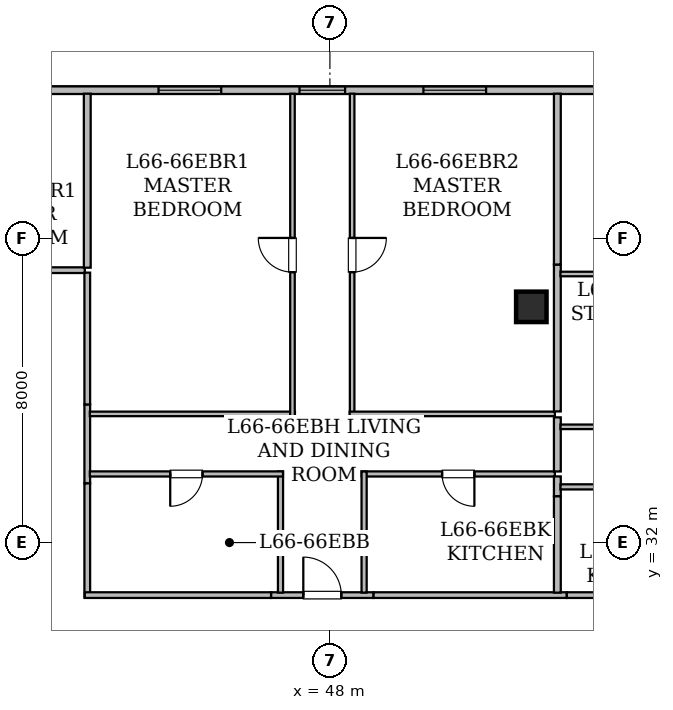
"""IFC4 building model, lengths in metres.
Left out: names, types, materials, properties, quantities, classifications, styles, units other than length and angle.
Written with IfcOpenShell. Run it as: python <this file> out.ifc"""

import sys

from ifc_helpers import new_model, si_unit, direction, frame, frame_2d, origin, origin_2d, place, context, subcontext, project, spatial, rectangle, hollow_rectangle, extrude, element, fill, save


model = new_model("IFC4")
c1 = context("Model", 3, precision=1e-05, world=origin(), true_north=direction((0.0, 1.0)))
c2 = subcontext(c1, "Body", "Model", "MODEL_VIEW")
j1 = project(units=[si_unit("LENGTHUNIT", "METRE"), si_unit("PLANEANGLEUNIT", "RADIAN")], contexts=[c1])
p1 = place(None, origin())
s1 = spatial("IfcSite", under=j1, at=p1, CompositionType="ELEMENT")
p2 = place(p1, origin())
s2 = spatial("IfcBuilding", under=s1, at=p2, CompositionType="ELEMENT")
p3 = place(p2, frame((0.0, 0.0, 257.35)))
s3 = spatial("IfcBuildingStorey", under=s2, at=p3, CompositionType="ELEMENT", Elevation=257.35)
for number, where, z_axis, x_axis in (
    (1, (51.083, 41.5, 0.0), (0.0, 0.0, 1.0), (1.0, 0.0, 0.0)),
    (2, (53.3, 38.2, 0.0), (0.0, 0.0, 1.0), (1.0, 0.0, 0.0)),
):
    element("IfcColumn", number, at=place(p3, frame(where, z_axis=z_axis, x_axis=x_axis)), inside=s3, PredefinedType="COLUMN", context=c2, shape_type="SweptSolid", body=[
        extrude(hollow_rectangle(XDim=0.8, YDim=0.8, WallThickness=0.04, at=origin_2d()), origin(), (0.0, 0.0, 1.0), 3.65),
    ])
p4 = place(p3, frame((24.302, 43.9, 0.0), z_axis=(0.0, 0.0, 1.0), x_axis=(1.0, 0.0, 0.0)))
e3 = element("IfcWall", 3, at=p4, inside=s3, PredefinedType="STANDARD", context=c2, shape_type="SweptSolid", body=[
    extrude(rectangle(XDim=41.457, YDim=0.2, at=frame_2d((20.729, 0.0))), origin(), (0.0, 0.0, 1.0), 3.43),
])
p5 = place(p4, frame((0.604, 0.0, 0.85)))
e4 = element("IfcOpeningElement", 4, at=p5, cuts=e3, PredefinedType="OPENING", context=c2, shape_type="SweptSolid", body=[
    extrude(rectangle(XDim=1.65, YDim=1.55, at=frame_2d((0.825, 0.775))), frame((0.0, 0.11, 0.0), z_axis=(0.0, -1.0, 0.0), x_axis=(1.0, 0.0, 0.0)), (0.0, 0.0, 1.0), 0.22),
])
p6 = place(p4, frame((9.098, 0.0, 0.85)))
e5 = element("IfcOpeningElement", 5, at=p6, cuts=e3, PredefinedType="OPENING", context=c2, shape_type="SweptSolid", body=[
    extrude(rectangle(XDim=1.65, YDim=1.55, at=frame_2d((0.825, 0.775))), frame((0.0, 0.11, 0.0), z_axis=(0.0, -1.0, 0.0), x_axis=(1.0, 0.0, 0.0)), (0.0, 0.0, 1.0), 0.22),
])
p7 = place(p4, frame((14.405, 0.0, 0.85)))
e6 = element("IfcOpeningElement", 6, at=p7, cuts=e3, PredefinedType="OPENING", context=c2, shape_type="SweptSolid", body=[
    extrude(rectangle(XDim=1.65, YDim=1.55, at=frame_2d((0.825, 0.775))), frame((0.0, 0.11, 0.0), z_axis=(0.0, -1.0, 0.0), x_axis=(1.0, 0.0, 0.0)), (0.0, 0.0, 1.0), 0.22),
])
p8 = place(p4, frame((22.898, 0.0, 0.8)))
e7 = element("IfcOpeningElement", 7, at=p8, cuts=e3, PredefinedType="OPENING", context=c2, shape_type="SweptSolid", body=[
    extrude(rectangle(XDim=1.2, YDim=1.5, at=frame_2d((0.6, 0.75))), frame((0.0, 0.11, 0.0), z_axis=(0.0, -1.0, 0.0), x_axis=(1.0, 0.0, 0.0)), (0.0, 0.0, 1.0), 0.22),
])
p9 = place(p4, frame((19.188, 0.0, 0.85)))
e8 = element("IfcOpeningElement", 8, at=p9, cuts=e3, PredefinedType="OPENING", context=c2, shape_type="SweptSolid", body=[
    extrude(rectangle(XDim=1.65, YDim=1.55, at=frame_2d((0.825, 0.775))), frame((0.0, 0.11, 0.0), z_axis=(0.0, -1.0, 0.0), x_axis=(1.0, 0.0, 0.0)), (0.0, 0.0, 1.0), 0.22),
])
p10 = place(p4, frame((26.158, 0.0, 0.85)))
e9 = element("IfcOpeningElement", 9, at=p10, cuts=e3, PredefinedType="OPENING", context=c2, shape_type="SweptSolid", body=[
    extrude(rectangle(XDim=1.65, YDim=1.55, at=frame_2d((0.825, 0.775))), frame((0.0, 0.11, 0.0), z_axis=(0.0, -1.0, 0.0), x_axis=(1.0, 0.0, 0.0)), (0.0, 0.0, 1.0), 0.22),
])
p11 = place(p4, frame((32.408, 0.0, 0.85)))
e10 = element("IfcOpeningElement", 10, at=p11, cuts=e3, PredefinedType="OPENING", context=c2, shape_type="SweptSolid", body=[
    extrude(rectangle(XDim=1.65, YDim=1.55, at=frame_2d((0.825, 0.775))), frame((0.0, 0.11, 0.0), z_axis=(0.0, -1.0, 0.0), x_axis=(1.0, 0.0, 0.0)), (0.0, 0.0, 1.0), 0.22),
])
p12 = place(p3, frame((37.699, 39.165, 0.0), z_axis=(0.0, 0.0, 1.0), x_axis=(1.0, 0.0, 0.0)))
e11 = element("IfcWall", 11, at=p12, inside=s3, PredefinedType="STANDARD", context=c2, shape_type="SweptSolid", body=[
    extrude(rectangle(XDim=3.851, YDim=0.15, at=frame_2d((1.926, 0.0))), origin(), (0.0, 0.0, 1.0), 2.725),
])
p13 = place(p3, frame((41.615, 35.632, 0.0), z_axis=(0.0, 0.0, 1.0), x_axis=(0.0, -1.0, 0.0)))
e12 = element("IfcWall", 12, at=p13, inside=s3, PredefinedType="STANDARD", context=c2, shape_type="SweptSolid", body=[
    extrude(rectangle(XDim=2.078, YDim=0.15, at=frame_2d((1.039, 0.0))), origin(), (0.0, 0.0, 1.0), 3.43),
])
p14 = place(p3, frame((46.451, 30.615, 0.0), z_axis=(0.0, 0.0, 1.0), x_axis=(1.0, 0.0, 0.0)))
e13 = element("IfcWall", 13, at=p14, inside=s3, PredefinedType="STANDARD", context=c2, shape_type="SweptSolid", body=[
    extrude(rectangle(XDim=2.698, YDim=0.15, at=frame_2d((1.349, 0.0))), origin(), (0.0, 0.0, 1.0), 3.43),
])
p15 = place(p14, frame((0.849, 0.0, 0.0)))
e14 = element("IfcOpeningElement", 14, at=p15, cuts=e13, PredefinedType="OPENING", context=c2, shape_type="SweptSolid", body=[
    extrude(rectangle(XDim=1.0, YDim=2.15, at=frame_2d((0.5, 1.075))), frame((0.0, 0.085, 0.0), z_axis=(0.0, -1.0, 0.0), x_axis=(1.0, 0.0, 0.0)), (0.0, 0.0, 1.0), 0.17),
])
p16 = place(p3, frame((41.615, 33.554, 0.0), z_axis=(0.0, 0.0, 1.0), x_axis=(0.0, -1.0, 0.0)))
e15 = element("IfcWall", 15, at=p16, inside=s3, PredefinedType="STANDARD", context=c2, shape_type="SweptSolid", body=[
    extrude(rectangle(XDim=3.004, YDim=0.15, at=frame_2d((1.502, 0.0))), origin(), (0.0, 0.0, 1.0), 3.065),
])
p17 = place(p3, frame((41.55, 30.615, 0.0), z_axis=(0.0, 0.0, 1.0), x_axis=(1.0, 0.0, 0.0)))
e16 = element("IfcWall", 16, at=p17, inside=s3, PredefinedType="STANDARD", context=c2, shape_type="SweptSolid", body=[
    extrude(rectangle(XDim=4.901, YDim=0.15, at=frame_2d((2.45, 0.0))), origin(), (0.0, 0.0, 1.0), 3.43),
])
p18 = place(p3, frame((49.149, 30.615, 0.0), z_axis=(0.0, 0.0, 1.0), x_axis=(1.0, 0.0, 0.0)))
e17 = element("IfcWall", 17, at=p18, inside=s3, PredefinedType="STANDARD", context=c2, shape_type="SweptSolid", body=[
    extrude(rectangle(XDim=5.085, YDim=0.15, at=frame_2d((2.542, 0.0))), origin(), (0.0, 0.0, 1.0), 2.725),
])
p19 = place(p3, frame((41.615, 39.1, 0.0), z_axis=(0.0, 0.0, 1.0), x_axis=(0.0, -1.0, 0.0)))
e18 = element("IfcWall", 18, at=p19, inside=s3, PredefinedType="STANDARD", context=c2, shape_type="SweptSolid", body=[
    extrude(rectangle(XDim=3.468, YDim=0.15, at=frame_2d((1.734, 0.0))), origin(), (0.0, 0.0, 1.0), 2.725),
])
p20 = place(p3, frame((54.234, 30.615, 0.0), z_axis=(0.0, 0.0, 1.0), x_axis=(1.0, 0.0, 0.0)))
e19 = element("IfcWall", 19, at=p20, inside=s3, PredefinedType="STANDARD", context=c2, shape_type="SweptSolid", body=[
    extrude(rectangle(XDim=5.03, YDim=0.15, at=frame_2d((2.515, 0.0))), origin(), (0.0, 0.0, 1.0), 3.43),
])
p21 = place(p3, frame((41.615, 43.808, 0.0), z_axis=(0.0, 0.0, 1.0), x_axis=(0.0, -1.0, 0.0)))
e20 = element("IfcWall", 20, at=p21, inside=s3, PredefinedType="STANDARD", context=c2, shape_type="SweptSolid", body=[
    extrude(rectangle(XDim=4.578, YDim=0.18, at=frame_2d((2.289, 0.0))), origin(), (0.0, 0.0, 1.0), 2.887),
])
p22 = place(p3, frame((46.7, 30.68, 0.0), z_axis=(0.0, 0.0, 1.0), x_axis=(0.0, 1.0, 0.0)))
e21 = element("IfcWall", 21, at=p22, inside=s3, PredefinedType="PARTITIONING", context=c2, shape_type="SweptSolid", body=[
    extrude(rectangle(XDim=3.188, YDim=0.135, at=frame_2d((1.594, 0.0))), origin(), (0.0, 0.0, 1.0), 3.065),
])
p23 = place(p3, frame((46.765, 33.803, 0.0), z_axis=(0.0, 0.0, 1.0), x_axis=(-1.0, 0.0, 0.0)))
e22 = element("IfcWall", 22, at=p23, inside=s3, PredefinedType="PARTITIONING", context=c2, shape_type="SweptSolid", body=[
    extrude(rectangle(XDim=5.083, YDim=0.135, at=frame_2d((2.542, 0.0))), origin(), (0.0, 0.0, 1.0), 3.43),
])
p24 = place(p23, frame((2.117, 0.0, 0.0)))
e23 = element("IfcOpeningElement", 23, at=p24, cuts=e22, PredefinedType="OPENING", context=c2, shape_type="SweptSolid", body=[
    extrude(rectangle(XDim=0.85, YDim=2.1, at=frame_2d((0.425, 1.05))), frame((0.0, 0.077, 0.0), z_axis=(0.0, -1.0, 0.0), x_axis=(1.0, 0.0, 0.0)), (0.0, 0.0, 1.0), 0.155),
])
p25 = place(p3, frame((53.92, 33.803, 0.0), z_axis=(0.0, 0.0, 1.0), x_axis=(-1.0, 0.0, 0.0)))
e24 = element("IfcWall", 24, at=p25, inside=s3, PredefinedType="PARTITIONING", context=c2, shape_type="SweptSolid", body=[
    extrude(rectangle(XDim=5.085, YDim=0.135, at=frame_2d((2.542, 0.0))), origin(), (0.0, 0.0, 1.0), 2.725),
])
p26 = place(p25, frame((2.118, 0.0, 0.0)))
e25 = element("IfcOpeningElement", 25, at=p26, cuts=e24, PredefinedType="OPENING", context=c2, shape_type="SweptSolid", body=[
    extrude(rectangle(XDim=0.85, YDim=2.1, at=frame_2d((0.425, 1.05))), frame((0.0, 0.077, 0.0), z_axis=(0.0, -1.0, 0.0), x_axis=(1.0, 0.0, 0.0)), (0.0, 0.0, 1.0), 0.155),
])
p27 = place(p3, frame((48.9, 33.868, 0.0), z_axis=(0.0, 0.0, 1.0), x_axis=(0.0, -1.0, 0.0)))
e26 = element("IfcWall", 26, at=p27, inside=s3, PredefinedType="PARTITIONING", context=c2, shape_type="SweptSolid", body=[
    extrude(rectangle(XDim=3.188, YDim=0.135, at=frame_2d((1.594, 0.0))), origin(), (0.0, 0.0, 1.0), 3.065),
])
p28 = place(p3, frame((41.682, 35.383, 0.0), z_axis=(0.0, 0.0, 1.0), x_axis=(1.0, 0.0, 0.0)))
e27 = element("IfcWall", 27, at=p28, inside=s3, PredefinedType="PARTITIONING", context=c2, shape_type="SweptSolid", body=[
    extrude(rectangle(XDim=5.398, YDim=0.12, at=frame_2d((2.699, 0.0))), origin(), (0.0, 0.0, 1.0), 3.43),
])
p29 = place(p3, frame((47.015, 35.318, 0.0), z_axis=(0.0, 0.0, 1.0), x_axis=(0.0, 1.0, 0.0)))
e28 = element("IfcWall", 28, at=p29, inside=s3, PredefinedType="PARTITIONING", context=c2, shape_type="SweptSolid", body=[
    extrude(rectangle(XDim=8.49, YDim=0.12, at=frame_2d((4.245, 0.0))), origin(), (0.0, 0.0, 1.0), 2.725),
])
p30 = place(p29, frame((3.795, 0.0, 0.0)))
e29 = element("IfcOpeningElement", 29, at=p30, cuts=e28, PredefinedType="OPENING", context=c2, shape_type="SweptSolid", body=[
    extrude(rectangle(XDim=0.9, YDim=2.1, at=frame_2d((0.45, 1.05))), frame((0.0, 0.07, 0.0), z_axis=(0.0, -1.0, 0.0), x_axis=(1.0, 0.0, 0.0)), (0.0, 0.0, 1.0), 0.14),
])
p31 = place(p3, frame((48.585, 43.808, 0.0), z_axis=(0.0, 0.0, 1.0), x_axis=(0.0, -1.0, 0.0)))
e30 = element("IfcWall", 30, at=p31, inside=s3, PredefinedType="PARTITIONING", context=c2, shape_type="SweptSolid", body=[
    extrude(rectangle(XDim=8.49, YDim=0.12, at=frame_2d((4.245, 0.0))), origin(), (0.0, 0.0, 1.0), 2.725),
])
p32 = place(p31, frame((3.795, 0.0, 0.0)))
e31 = element("IfcOpeningElement", 31, at=p32, cuts=e30, PredefinedType="OPENING", context=c2, shape_type="SweptSolid", body=[
    extrude(rectangle(XDim=0.9, YDim=2.1, at=frame_2d((0.45, 1.05))), frame((0.0, 0.07, 0.0), z_axis=(0.0, -1.0, 0.0), x_axis=(1.0, 0.0, 0.0)), (0.0, 0.0, 1.0), 0.14),
])
p33 = place(p3, frame((48.52, 35.383, 0.0), z_axis=(0.0, 0.0, 1.0), x_axis=(1.0, 0.0, 0.0)))
e32 = element("IfcWall", 32, at=p33, inside=s3, PredefinedType="PARTITIONING", context=c2, shape_type="SweptSolid", body=[
    extrude(rectangle(XDim=5.4, YDim=0.12, at=frame_2d((2.7, 0.0))), origin(), (0.0, 0.0, 1.0), 2.725),
])
p34 = place(p3, frame((53.985, 35.292, 0.0), z_axis=(0.0, 0.0, 1.0), x_axis=(0.0, -1.0, 0.0)))
e33 = element("IfcWall", 33, at=p34, inside=s3, PredefinedType="STANDARD", context=c2, shape_type="SweptSolid", body=[
    extrude(rectangle(XDim=1.424, YDim=0.18, at=frame_2d((0.712, 0.0))), origin(), (0.0, 0.0, 1.0), 3.43),
])
p35 = place(p3, frame((53.985, 33.738, 0.0), z_axis=(0.0, 0.0, 1.0), x_axis=(0.0, -1.0, 0.0)))
e34 = element("IfcWall", 34, at=p35, inside=s3, PredefinedType="STANDARD", context=c2, shape_type="SweptSolid", body=[
    extrude(rectangle(XDim=0.524, YDim=0.18, at=frame_2d((0.262, 0.0))), origin(), (0.0, 0.0, 1.0), 3.065),
])
p36 = place(p3, frame((53.985, 33.214, 0.0), z_axis=(0.0, 0.0, 1.0), x_axis=(0.0, -1.0, 0.0)))
e35 = element("IfcWall", 35, at=p36, inside=s3, PredefinedType="STANDARD", context=c2, shape_type="SweptSolid", body=[
    extrude(rectangle(XDim=2.534, YDim=0.18, at=frame_2d((1.267, 0.0))), origin(), (0.0, 0.0, 1.0), 3.43),
])
p37 = place(p3, frame((53.985, 39.313, 0.0), z_axis=(0.0, 0.0, 1.0), x_axis=(0.0, -1.0, 0.0)))
e36 = element("IfcWall", 36, at=p37, inside=s3, PredefinedType="STANDARD", context=c2, shape_type="SweptSolid", body=[
    extrude(rectangle(XDim=3.865, YDim=0.18, at=frame_2d((1.933, 0.0))), origin(), (0.0, 0.0, 1.0), 2.725),
])
p38 = place(p3, frame((53.985, 43.808, 0.0), z_axis=(0.0, 0.0, 1.0), x_axis=(0.0, -1.0, 0.0)))
e37 = element("IfcWall", 37, at=p38, inside=s3, PredefinedType="STANDARD", context=c2, shape_type="SweptSolid", body=[
    extrude(rectangle(XDim=4.495, YDim=0.18, at=frame_2d((2.248, 0.0))), origin(), (0.0, 0.0, 1.0), 2.887),
])
p39 = place(p3, frame((59.578, 33.463, 0.0), z_axis=(0.0, 0.0, 1.0), x_axis=(-1.0, 0.0, 0.0)))
e38 = element("IfcWall", 38, at=p39, inside=s3, PredefinedType="PARTITIONING", context=c2, shape_type="SweptSolid", body=[
    extrude(rectangle(XDim=5.511, YDim=0.135, at=frame_2d((2.755, 0.0))), origin(), (0.0, 0.0, 1.0), 3.065),
])
p40 = place(p39, frame((2.331, 0.0, 0.0)))
e39 = element("IfcOpeningElement", 39, at=p40, cuts=e38, PredefinedType="OPENING", context=c2, shape_type="SweptSolid", body=[
    extrude(rectangle(XDim=0.85, YDim=2.1, at=frame_2d((0.425, 1.05))), frame((0.0, 0.077, 0.0), z_axis=(0.0, -1.0, 0.0), x_axis=(1.0, 0.0, 0.0)), (0.0, 0.0, 1.0), 0.155),
])
p41 = place(p3, frame((54.067, 35.043, 0.0), z_axis=(0.0, 0.0, 1.0), x_axis=(1.0, 0.0, 0.0)))
e40 = element("IfcWall", 40, at=p41, inside=s3, PredefinedType="PARTITIONING", context=c2, shape_type="SweptSolid", body=[
    extrude(rectangle(XDim=7.083, YDim=0.12, at=frame_2d((3.542, 0.0))), origin(), (0.0, 0.0, 1.0), 3.43),
])
p42 = place(p41, frame((3.091, 0.0, 0.0)))
e41 = element("IfcOpeningElement", 41, at=p42, cuts=e40, PredefinedType="OPENING", context=c2, shape_type="SweptSolid", body=[
    extrude(rectangle(XDim=0.9, YDim=2.1, at=frame_2d((0.45, 1.05))), frame((0.0, 0.07, 0.0), z_axis=(0.0, -1.0, 0.0), x_axis=(1.0, 0.0, 0.0)), (0.0, 0.0, 1.0), 0.14),
])
p43 = place(p3, frame((54.067, 39.064, 0.0), z_axis=(0.0, 0.0, 1.0), x_axis=(1.0, 0.0, 0.0)))
e42 = element("IfcWall", 42, at=p43, inside=s3, PredefinedType="PARTITIONING", context=c2, shape_type="SweptSolid", body=[
    extrude(rectangle(XDim=6.964, YDim=0.12, at=frame_2d((3.482, 0.0))), origin(), (0.0, 0.0, 1.0), 2.725),
])
p44 = place(p8, origin())
e43 = element("IfcWindow", 43, at=p44, inside=s3, PartitioningType="SINGLE_PANEL", PredefinedType="WINDOW", context=c2, shape_type="SweptSolid", body=[
    extrude(rectangle(XDim=1.2, YDim=1.5, at=frame_2d((0.6, 0.75))), frame((0.0, 0.03, 0.0), z_axis=(0.0, -1.0, 0.0), x_axis=(1.0, 0.0, 0.0)), (0.0, 0.0, 1.0), 0.06),
])
fill(e7, e43)
p45 = place(p9, origin())
e44 = element("IfcWindow", 44, at=p45, inside=s3, PartitioningType="SINGLE_PANEL", PredefinedType="WINDOW", context=c2, shape_type="SweptSolid", body=[
    extrude(rectangle(XDim=1.65, YDim=1.55, at=frame_2d((0.825, 0.775))), frame((0.0, 0.03, 0.0), z_axis=(0.0, -1.0, 0.0), x_axis=(1.0, 0.0, 0.0)), (0.0, 0.0, 1.0), 0.06),
])
fill(e8, e44)
p46 = place(p10, origin())
e45 = element("IfcWindow", 45, at=p46, inside=s3, PartitioningType="SINGLE_PANEL", PredefinedType="WINDOW", context=c2, shape_type="SweptSolid", body=[
    extrude(rectangle(XDim=1.65, YDim=1.55, at=frame_2d((0.825, 0.775))), frame((0.0, 0.03, 0.0), z_axis=(0.0, -1.0, 0.0), x_axis=(1.0, 0.0, 0.0)), (0.0, 0.0, 1.0), 0.06),
])
fill(e9, e45)
p47 = place(p15, origin())
e46 = element("IfcDoor", 46, at=p47, inside=s3, OperationType="SINGLE_SWING_LEFT", PredefinedType="DOOR", context=c2, shape_type="SweptSolid", body=[
    extrude(rectangle(XDim=1.0, YDim=2.15, at=frame_2d((0.5, 1.075))), frame((0.0, 0.025, 0.0), z_axis=(0.0, -1.0, 0.0), x_axis=(1.0, 0.0, 0.0)), (0.0, 0.0, 1.0), 0.05),
])
fill(e14, e46)
p48 = place(p24, origin())
e47 = element("IfcDoor", 47, at=p48, inside=s3, OperationType="SINGLE_SWING_RIGHT", PredefinedType="DOOR", context=c2, shape_type="SweptSolid", body=[
    extrude(rectangle(XDim=0.85, YDim=2.1, at=frame_2d((0.425, 1.05))), frame((0.0, 0.025, 0.0), z_axis=(0.0, -1.0, 0.0), x_axis=(1.0, 0.0, 0.0)), (0.0, 0.0, 1.0), 0.05),
])
fill(e23, e47)
p49 = place(p26, origin())
e48 = element("IfcDoor", 48, at=p49, inside=s3, OperationType="SINGLE_SWING_LEFT", PredefinedType="DOOR", context=c2, shape_type="SweptSolid", body=[
    extrude(rectangle(XDim=0.85, YDim=2.1, at=frame_2d((0.425, 1.05))), frame((0.0, 0.025, 0.0), z_axis=(0.0, -1.0, 0.0), x_axis=(1.0, 0.0, 0.0)), (0.0, 0.0, 1.0), 0.05),
])
fill(e25, e48)
p50 = place(p30, origin())
e49 = element("IfcDoor", 49, at=p50, inside=s3, OperationType="SINGLE_SWING_RIGHT", PredefinedType="DOOR", context=c2, shape_type="SweptSolid", body=[
    extrude(rectangle(XDim=0.9, YDim=2.1, at=frame_2d((0.45, 1.05))), frame((0.0, 0.025, 0.0), z_axis=(0.0, -1.0, 0.0), x_axis=(1.0, 0.0, 0.0)), (0.0, 0.0, 1.0), 0.05),
])
fill(e29, e49)
p51 = place(p32, origin())
e50 = element("IfcDoor", 50, at=p51, inside=s3, OperationType="SINGLE_SWING_LEFT", PredefinedType="DOOR", context=c2, shape_type="SweptSolid", body=[
    extrude(rectangle(XDim=0.9, YDim=2.1, at=frame_2d((0.45, 1.05))), frame((0.0, 0.025, 0.0), z_axis=(0.0, -1.0, 0.0), x_axis=(1.0, 0.0, 0.0)), (0.0, 0.0, 1.0), 0.05),
])
fill(e31, e50)
save(model, sys.argv[1])
